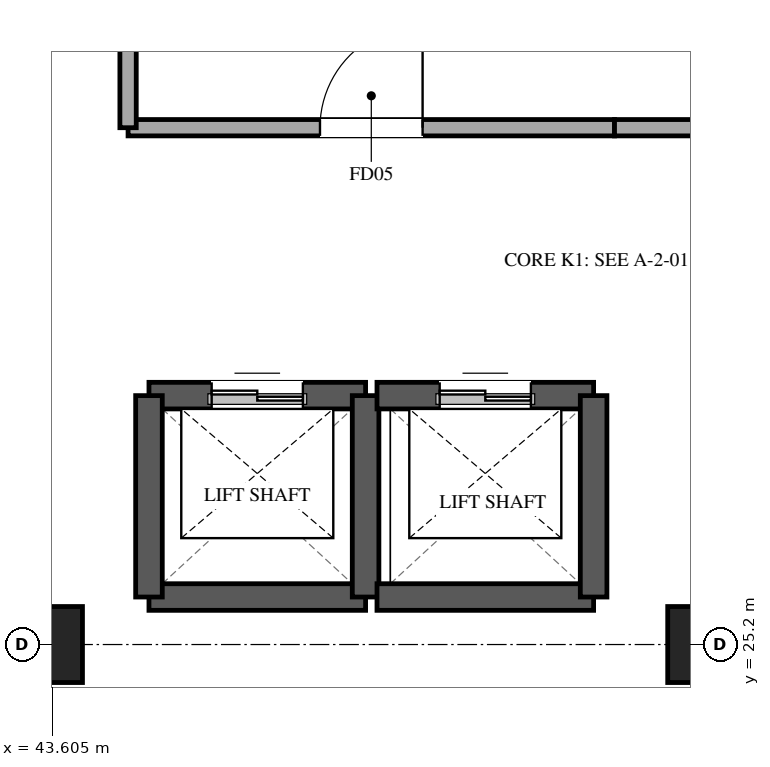
"""IFC4 building model, lengths in metres.
Left out: names, types, materials, properties, quantities, classifications, styles, units other than length and angle.
Written with IfcOpenShell. Run it as: python <this file> out.ifc"""

import sys

from ifc_helpers import new_model, si_unit, direction, frame, frame_2d, origin, origin_2d, place, context, subcontext, project, spatial, rectangle, extrude, element, fill, save


model = new_model("IFC4")
c1 = context("Model", 3, precision=1e-05, world=origin(), true_north=direction((0.0, 1.0)))
c2 = subcontext(c1, "Body", "Model", "MODEL_VIEW")
j1 = project(units=[si_unit("LENGTHUNIT", "METRE"), si_unit("PLANEANGLEUNIT", "RADIAN")], contexts=[c1])
p1 = place(None, origin())
s1 = spatial("IfcSite", under=j1, at=p1, CompositionType="ELEMENT")
p2 = place(p1, origin())
s2 = spatial("IfcBuilding", under=s1, at=p2, CompositionType="ELEMENT")
p3 = place(p2, frame((0.0, 0.0, 6.0)))
s3 = spatial("IfcBuildingStorey", under=s2, at=p3, CompositionType="ELEMENT", Elevation=6.0)
for number, where, z_axis, x_axis in (
    (1, (43.5, 25.2, 0.0), (0.0, 0.0, 1.0), (1.0, 0.0, 0.0)),
    (2, (52.2, 25.2, 0.0), (0.0, 0.0, 1.0), (1.0, 0.0, 0.0)),
):
    element("IfcColumn", number, at=place(p3, frame(where, z_axis=z_axis, x_axis=x_axis)), inside=s3, PredefinedType="COLUMN", context=c2, shape_type="SweptSolid", body=[
        extrude(rectangle(XDim=1.0, YDim=1.0, at=origin_2d()), origin(), (0.0, 0.0, 1.0), 5.4),
    ])
p4 = place(p3, frame((44.875, 28.475, 0.0), z_axis=(0.0, 0.0, 1.0), x_axis=(1.0, 0.0, 0.0)))
e3 = element("IfcWall", 3, at=p4, inside=s3, PredefinedType="SHEAR", context=c2, shape_type="SweptSolid", body=[
    extrude(rectangle(XDim=2.85, YDim=0.35, at=frame_2d((1.425, 0.0))), origin(), (0.0, 0.0, 1.0), 5.4),
])
p5 = place(p4, frame((0.825, 0.0, 0.0)))
e4 = element("IfcOpeningElement", 4, at=p5, cuts=e3, PredefinedType="OPENING", context=c2, shape_type="SweptSolid", body=[
    extrude(rectangle(XDim=1.2, YDim=2.2, at=frame_2d((0.6, 1.1))), frame((0.0, 0.185, 0.0), z_axis=(0.0, -1.0, 0.0), x_axis=(1.0, 0.0, 0.0)), (0.0, 0.0, 1.0), 0.37),
])
p6 = place(p3, frame((47.725, 25.825, 0.0), z_axis=(0.0, 0.0, 1.0), x_axis=(-1.0, 0.0, 0.0)))
e5 = element("IfcWall", 5, at=p6, inside=s3, PredefinedType="SHEAR", context=c2, shape_type="SweptSolid", body=[
    extrude(rectangle(XDim=2.85, YDim=0.35, at=frame_2d((1.425, 0.0))), origin(), (0.0, 0.0, 1.0), 5.4),
])
for number, where, z_axis, x_axis in (
    (6, (44.875, 25.825, 0.0), (0.0, 0.0, 1.0), (0.0, 1.0, 0.0)),
    (7, (47.725, 28.475, 0.0), (0.0, 0.0, 1.0), (0.0, -1.0, 0.0)),
):
    element("IfcWall", number, at=place(p3, frame(where, z_axis=z_axis, x_axis=x_axis)), inside=s3, PredefinedType="SHEAR", context=c2, shape_type="SweptSolid", body=[
        extrude(rectangle(XDim=2.65, YDim=0.35, at=frame_2d((1.325, 0.0))), origin(), (0.0, 0.0, 1.0), 5.4),
    ])
p7 = place(p3, frame((47.875, 28.475, 0.0), z_axis=(0.0, 0.0, 1.0), x_axis=(1.0, 0.0, 0.0)))
e8 = element("IfcWall", 8, at=p7, inside=s3, PredefinedType="SHEAR", context=c2, shape_type="SweptSolid", body=[
    extrude(rectangle(XDim=2.85, YDim=0.35, at=frame_2d((1.425, 0.0))), origin(), (0.0, 0.0, 1.0), 5.4),
])
p8 = place(p7, frame((0.825, 0.0, 0.0)))
e9 = element("IfcOpeningElement", 9, at=p8, cuts=e8, PredefinedType="OPENING", context=c2, shape_type="SweptSolid", body=[
    extrude(rectangle(XDim=1.2, YDim=2.2, at=frame_2d((0.6, 1.1))), frame((0.0, 0.185, 0.0), z_axis=(0.0, -1.0, 0.0), x_axis=(1.0, 0.0, 0.0)), (0.0, 0.0, 1.0), 0.37),
])
p9 = place(p3, frame((50.725, 25.825, 0.0), z_axis=(0.0, 0.0, 1.0), x_axis=(-1.0, 0.0, 0.0)))
e10 = element("IfcWall", 10, at=p9, inside=s3, PredefinedType="SHEAR", context=c2, shape_type="SweptSolid", body=[
    extrude(rectangle(XDim=2.85, YDim=0.35, at=frame_2d((1.425, 0.0))), origin(), (0.0, 0.0, 1.0), 5.4),
])
p10 = place(p3, frame((50.725, 28.475, 0.0), z_axis=(0.0, 0.0, 1.0), x_axis=(0.0, -1.0, 0.0)))
e11 = element("IfcWall", 11, at=p10, inside=s3, PredefinedType="SHEAR", context=c2, shape_type="SweptSolid", body=[
    extrude(rectangle(XDim=2.65, YDim=0.35, at=frame_2d((1.325, 0.0))), origin(), (0.0, 0.0, 1.0), 5.4),
])
p11 = place(p3, frame((44.6, 32.0, 0.0), z_axis=(0.0, 0.0, 1.0), x_axis=(1.0, 0.0, 0.0)))
e12 = element("IfcWall", 12, at=p11, inside=s3, PredefinedType="PARTITIONING", context=c2, shape_type="SweptSolid", body=[
    extrude(rectangle(XDim=6.4, YDim=0.215, at=frame_2d((3.2, 0.0))), origin(), (0.0, 0.0, 1.0), 5.06),
])
p12 = place(p11, frame((2.525, 0.0, 0.0)))
e13 = element("IfcOpeningElement", 13, at=p12, cuts=e12, PredefinedType="OPENING", context=c2, shape_type="SweptSolid", body=[
    extrude(rectangle(XDim=1.35, YDim=2.2, at=frame_2d((0.675, 1.1))), frame((0.0, 0.118, 0.0), z_axis=(0.0, -1.0, 0.0), x_axis=(1.0, 0.0, 0.0)), (0.0, 0.0, 1.0), 0.235),
])
p13 = place(p3, frame((44.6, 32.0, 0.0), z_axis=(0.0, 0.0, 1.0), x_axis=(0.0, 1.0, 0.0)))
e14 = element("IfcWall", 14, at=p13, inside=s3, PredefinedType="PARTITIONING", context=c2, shape_type="SweptSolid", body=[
    extrude(rectangle(XDim=2.98, YDim=0.215, at=frame_2d((1.49, 0.0))), origin(), (0.0, 0.0, 1.0), 4.31),
])
p14 = place(p3, frame((52.8, 32.0, 0.0), z_axis=(0.0, 0.0, 1.0), x_axis=(-1.0, 0.0, 0.0)))
e15 = element("IfcWall", 15, at=p14, inside=s3, PredefinedType="PARTITIONING", context=c2, shape_type="SweptSolid", body=[
    extrude(rectangle(XDim=1.8, YDim=0.215, at=frame_2d((0.9, 0.0))), origin(), (0.0, 0.0, 1.0), 4.31),
])
p15 = place(p5, origin())
e16 = element("IfcDoor", 16, at=p15, inside=s3, OperationType="DOUBLE_DOOR_SLIDING", PredefinedType="DOOR", context=c2, shape_type="SweptSolid", body=[
    extrude(rectangle(XDim=1.2, YDim=2.2, at=frame_2d((0.6, 1.1))), frame((0.0, 0.025, 0.0), z_axis=(0.0, -1.0, 0.0), x_axis=(1.0, 0.0, 0.0)), (0.0, 0.0, 1.0), 0.05),
])
fill(e4, e16)
p16 = place(p8, origin())
e17 = element("IfcDoor", 17, at=p16, inside=s3, OperationType="DOUBLE_DOOR_SLIDING", PredefinedType="DOOR", context=c2, shape_type="SweptSolid", body=[
    extrude(rectangle(XDim=1.2, YDim=2.2, at=frame_2d((0.6, 1.1))), frame((0.0, 0.025, 0.0), z_axis=(0.0, -1.0, 0.0), x_axis=(1.0, 0.0, 0.0)), (0.0, 0.0, 1.0), 0.05),
])
fill(e9, e17)
p17 = place(p12, origin())
e18 = element("IfcDoor", 18, at=p17, inside=s3, OperationType="SINGLE_SWING_RIGHT", PredefinedType="DOOR", context=c2, shape_type="SweptSolid", body=[
    extrude(rectangle(XDim=1.35, YDim=2.2, at=frame_2d((0.675, 1.1))), frame((0.0, 0.025, 0.0), z_axis=(0.0, -1.0, 0.0), x_axis=(1.0, 0.0, 0.0)), (0.0, 0.0, 1.0), 0.05),
])
fill(e13, e18)
save(model, sys.argv[1])
